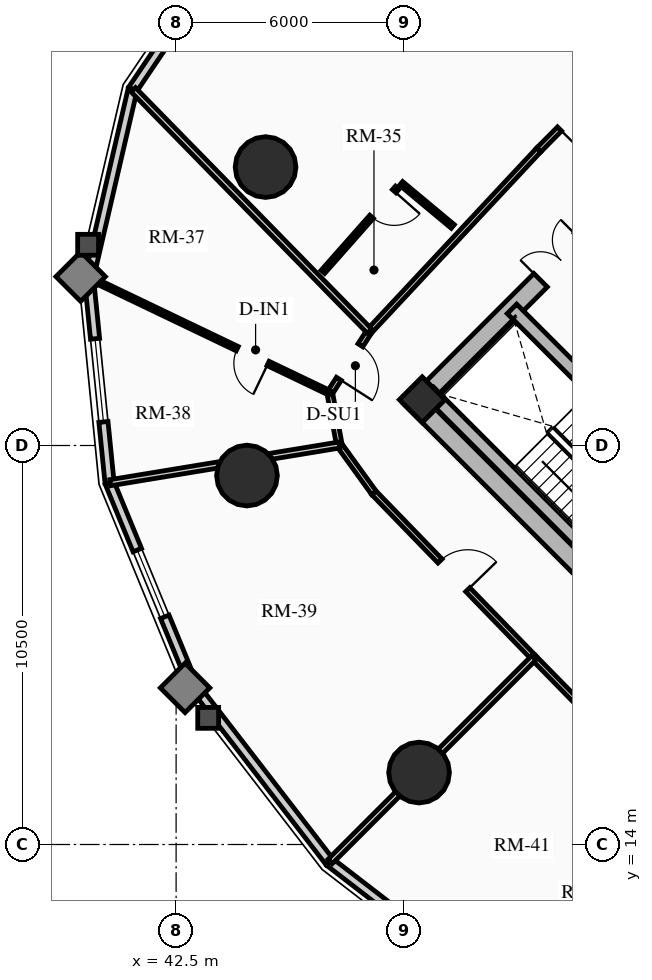
"""IFC4 building model, lengths in metres.
Left out: names, types, materials, properties, quantities, classifications, styles, units other than length and angle.
Written with IfcOpenShell. Run it as: python <this file> out.ifc"""

import sys

from ifc_helpers import new_model, si_unit, direction, frame, frame_2d, origin, origin_2d, place, context, subcontext, project, spatial, rectangle, circle, extrude, source, transform, mapped, element, fill, save


model = new_model("IFC4")
c1 = context("Model", 3, precision=1e-05, world=origin(), true_north=direction((0.0, 1.0)))
c2 = subcontext(c1, "Body", "Model", "MODEL_VIEW")
j1 = project(units=[si_unit("LENGTHUNIT", "METRE"), si_unit("PLANEANGLEUNIT", "RADIAN")], contexts=[c1])
p1 = place(None, origin())
s1 = spatial("IfcSite", under=j1, at=p1, CompositionType="ELEMENT")
p2 = place(p1, origin())
s2 = spatial("IfcBuilding", under=s1, at=p2, CompositionType="ELEMENT")
p3 = place(p2, frame((0.0, 0.0, 30.73)))
s3 = spatial("IfcBuildingStorey", under=s2, at=p3, CompositionType="ELEMENT", Elevation=30.73)
p4 = place(p3, frame((58.773, 15.661, 0.0), z_axis=(0.0, 0.0, 1.0), x_axis=(-0.707106781187, 0.707106781187, 0.0)))
e1 = element("IfcWall", 1, at=p4, inside=s3, PredefinedType="SHEAR", context=c2, shape_type="SweptSolid", body=[
    extrude(rectangle(XDim=14.3, YDim=0.5, at=frame_2d((7.15, 0.0))), origin(), (0.0, 0.0, 1.0), 2.91),
])
p5 = place(p3, frame((48.838, 25.596, 0.0), z_axis=(0.0, 0.0, 1.0), x_axis=(0.707106781187, 0.707106781187, 0.0)))
e2 = element("IfcWall", 2, at=p5, inside=s3, PredefinedType="SHEAR", context=c2, shape_type="SweptSolid", body=[
    extrude(rectangle(XDim=10.7, YDim=0.5, at=frame_2d((5.35, 0.0))), origin(), (0.0, 0.0, 1.0), 2.91),
])
m1 = source(origin(), c2, "Body", "SweptSolid", [
    extrude(rectangle(XDim=1.5, YDim=2.02, at=frame_2d((0.75, 1.01))), frame((0.0, 0.26, 0.0), z_axis=(0.0, -1.0, 0.0), x_axis=(1.0, 0.0, 0.0)), (0.0, 0.0, 1.0), 0.52),
])
p6 = place(p5, frame((4.6, 0.0, 0.0)))
e3 = element("IfcOpeningElement", 3, at=p6, cuts=e2, PredefinedType="OPENING", context=c2, shape_type="MappedRepresentation", body=[
    mapped(m1, transform((0.0, 0.0, 0.0), x_axis=(1.0, 0.0, 0.0), y_axis=(0.0, 1.0, 0.0), z_axis=(0.0, 0.0, 1.0), scale=1.0)),
])
p7 = place(p3, frame((61.096, 18.338, 0.0), z_axis=(0.0, 0.0, 1.0), x_axis=(-0.707106781187, 0.707106781187, 0.0)))
e4 = element("IfcWall", 4, at=p7, inside=s3, PredefinedType="SHEAR", context=c2, shape_type="SweptSolid", body=[
    extrude(rectangle(XDim=13.8, YDim=0.35, at=frame_2d((6.9, 0.0))), origin(), (0.0, 0.0, 1.0), 2.91),
])
m2 = source(origin(), c2, "Body", "SweptSolid", [
    extrude(rectangle(XDim=1.1, YDim=2.015, at=frame_2d((0.55, 1.007))), frame((0.0, 0.185, 0.0), z_axis=(0.0, -1.0, 0.0), x_axis=(1.0, 0.0, 0.0)), (0.0, 0.0, 1.0), 0.37),
])
p8 = place(p7, frame((4.9, 0.0, 0.0)))
e5 = element("IfcOpeningElement", 5, at=p8, cuts=e4, PredefinedType="OPENING", context=c2, shape_type="MappedRepresentation", body=[
    mapped(m2, transform((0.0, 0.0, 0.0), x_axis=(1.0, 0.0, 0.0), y_axis=(0.0, 1.0, 0.0), z_axis=(0.0, 0.0, 1.0), scale=1.0)),
])
m3 = source(origin(), c2, "Body", "SweptSolid", [
    extrude(rectangle(XDim=1.15, YDim=2.02, at=frame_2d((0.575, 1.01))), frame((0.0, 0.185, 0.0), z_axis=(0.0, -1.0, 0.0), x_axis=(1.0, 0.0, 0.0)), (0.0, 0.0, 1.0), 0.37),
])
p9 = place(p7, frame((7.32, 0.0, 0.0)))
e6 = element("IfcOpeningElement", 6, at=p9, cuts=e4, PredefinedType="OPENING", context=c2, shape_type="MappedRepresentation", body=[
    mapped(m3, transform((0.0, 0.0, 0.0), x_axis=(1.0, 0.0, 0.0), y_axis=(0.0, 1.0, 0.0), z_axis=(0.0, 0.0, 1.0), scale=1.0)),
])
p10 = place(p3, frame((53.922, 21.141, 0.0), z_axis=(0.0, 0.0, 1.0), x_axis=(-0.707106781187, 0.707106781187, 0.0)))
e7 = element("IfcWall", 7, at=p10, inside=s3, PredefinedType="SHEAR", context=c2, shape_type="SweptSolid", body=[
    extrude(rectangle(XDim=6.745, YDim=0.35, at=frame_2d((3.373, 0.0))), origin(), (0.0, 0.0, 1.0), 2.91),
])
p11 = place(p3, frame((48.976, 25.706, 0.0), z_axis=(0.0, 0.0, 1.0), x_axis=(0.707106781187, 0.707106781187, 0.0)))
e8 = element("IfcColumn", 8, at=p11, inside=s3, PredefinedType="COLUMN", context=c2, shape_type="SweptSolid", body=[
    extrude(rectangle(XDim=0.85, YDim=0.85, at=origin_2d()), origin(), (0.0, 0.0, 1.0), 2.91),
])
for number, where, z_axis, x_axis in (
    (9, (44.854, 31.827, 0.0), (0.0, 0.0, 1.0), (1.0, 0.0, 0.0)),
    (10, (44.365, 23.709, 0.0), (0.0, 0.0, 1.0), (1.0, 0.0, 0.0)),
    (11, (48.893, 15.893, 0.0), (0.0, 0.0, 1.0), (1.0, 0.0, 0.0)),
):
    element("IfcColumn", number, at=place(p3, frame(where, z_axis=z_axis, x_axis=x_axis)), inside=s3, PredefinedType="USERDEFINED", context=c2, shape_type="SweptSolid", body=[
        extrude(circle(Radius=0.8, at=origin_2d()), origin(), (0.0, 0.0, 1.0), 2.91),
    ])
p12 = place(p3, frame((41.356, 33.871, 0.0), z_axis=(0.0, 0.0, 1.0), x_axis=(0.559621532896, 0.828748297084, 0.0)))
e12 = element("IfcWall", 12, at=p12, inside=s3, PredefinedType="SOLIDWALL", context=c2, shape_type="SweptSolid", body=[
    extrude(rectangle(XDim=4.879, YDim=0.24, at=frame_2d((2.439, 0.0))), origin(), (0.0, 0.0, 1.0), 2.073),
])
m4 = source(origin(), c2, "Body", "SweptSolid", [
    extrude(rectangle(XDim=1.9, YDim=1.35, at=frame_2d((0.95, 0.675))), frame((0.0, 0.13, 0.0), z_axis=(0.0, -1.0, 0.0), x_axis=(1.0, 0.0, 0.0)), (0.0, 0.0, 1.0), 0.26),
])
p13 = place(p12, frame((1.489, 0.0, 0.65)))
e13 = element("IfcOpeningElement", 13, at=p13, cuts=e12, PredefinedType="OPENING", context=c2, shape_type="MappedRepresentation", body=[
    mapped(m4, transform((0.0, 0.0, 0.0), x_axis=(1.0, 0.0, 0.0), y_axis=(0.0, 1.0, 0.0), z_axis=(0.0, 0.0, 1.0), scale=1.0)),
])
p14 = place(p3, frame((40.206, 28.91, 0.0), z_axis=(0.0, 0.0, 1.0), x_axis=(0.22582585901, 0.974167686491, 0.0)))
e14 = element("IfcWall", 14, at=p14, inside=s3, PredefinedType="SOLIDWALL", context=c2, shape_type="SweptSolid", body=[
    extrude(rectangle(XDim=5.092, YDim=0.24, at=frame_2d((2.546, 0.0))), origin(), (0.0, 0.0, 1.0), 2.073),
])
p15 = place(p3, frame((40.749, 23.518, 0.0), z_axis=(0.0, 0.0, 1.0), x_axis=(-0.100190592135, 0.994968263437, 0.0)))
e15 = element("IfcWall", 15, at=p15, inside=s3, PredefinedType="SOLIDWALL", context=c2, shape_type="SweptSolid", body=[
    extrude(rectangle(XDim=5.419, YDim=0.24, at=frame_2d((2.71, 0.0))), origin(), (0.0, 0.0, 1.0), 2.073),
])
m5 = source(origin(), c2, "Body", "SweptSolid", [
    extrude(rectangle(XDim=2.2, YDim=1.35, at=frame_2d((1.1, 0.675))), frame((0.0, 0.13, 0.0), z_axis=(0.0, -1.0, 0.0), x_axis=(1.0, 0.0, 0.0)), (0.0, 0.0, 1.0), 0.26),
])
p16 = place(p15, frame((1.61, 0.0, 0.65)))
e16 = element("IfcOpeningElement", 16, at=p16, cuts=e15, PredefinedType="OPENING", context=c2, shape_type="MappedRepresentation", body=[
    mapped(m5, transform((0.0, 0.0, 0.0), x_axis=(1.0, 0.0, 0.0), y_axis=(0.0, 1.0, 0.0), z_axis=(0.0, 0.0, 1.0), scale=1.0)),
])
p17 = place(p3, frame((42.932, 18.222, 0.0), z_axis=(0.0, 0.0, 1.0), x_axis=(-0.381077764176, 0.924542988536, 0.0)))
e17 = element("IfcWall", 17, at=p17, inside=s3, PredefinedType="SOLIDWALL", context=c2, shape_type="SweptSolid", body=[
    extrude(rectangle(XDim=5.728, YDim=0.24, at=frame_2d((2.864, 0.0))), origin(), (0.0, 0.0, 1.0), 2.073),
])
p18 = place(p17, frame((1.914, 0.0, 0.65)))
e18 = element("IfcOpeningElement", 18, at=p18, cuts=e17, PredefinedType="OPENING", context=c2, shape_type="MappedRepresentation", body=[
    mapped(m4, transform((0.0, 0.0, 0.0), x_axis=(1.0, 0.0, 0.0), y_axis=(0.0, 1.0, 0.0), z_axis=(0.0, 0.0, 1.0), scale=1.0)),
])
p19 = place(p3, frame((46.541, 13.541, 0.0), z_axis=(0.0, 0.0, 1.0), x_axis=(-0.610494906082, 0.792020182601, 0.0)))
e19 = element("IfcWall", 19, at=p19, inside=s3, PredefinedType="SOLIDWALL", context=c2, shape_type="SweptSolid", body=[
    extrude(rectangle(XDim=5.911, YDim=0.24, at=frame_2d((2.956, 0.0))), origin(), (0.0, 0.0, 1.0), 2.073),
])
p20 = place(p3, frame((51.222, 9.932, 0.0), z_axis=(0.0, 0.0, 1.0), x_axis=(-0.792020182601, 0.610494906082, 0.0)))
e20 = element("IfcWall", 20, at=p20, inside=s3, PredefinedType="SOLIDWALL", context=c2, shape_type="SweptSolid", body=[
    extrude(rectangle(XDim=5.911, YDim=0.24, at=frame_2d((2.956, 0.0))), origin(), (0.0, 0.0, 1.0), 2.073),
])
p21 = place(p20, frame((1.855, 0.0, 0.65)))
e21 = element("IfcOpeningElement", 21, at=p21, cuts=e20, PredefinedType="OPENING", context=c2, shape_type="MappedRepresentation", body=[
    mapped(m5, transform((0.0, 0.0, 0.0), x_axis=(1.0, 0.0, 0.0), y_axis=(0.0, 1.0, 0.0), z_axis=(0.0, 0.0, 1.0), scale=1.0)),
])
p22 = place(p3, frame((54.427, 34.683, 0.0), z_axis=(0.0, 0.0, 1.0), x_axis=(-0.704178989986, -0.710022499687, 0.0)))
e22 = element("IfcWall", 22, at=p22, inside=s3, PredefinedType="PARTITIONING", context=c2, shape_type="SweptSolid", body=[
    extrude(rectangle(XDim=3.384, YDim=0.15, at=frame_2d((1.692, 0.0))), origin(), (0.0, 0.0, 1.0), 2.159),
])
m6 = source(origin(), c2, "Body", "SweptSolid", [
    extrude(rectangle(XDim=1.05, YDim=2.015, at=frame_2d((0.525, 1.007))), frame((0.0, 0.085, 0.0), z_axis=(0.0, -1.0, 0.0), x_axis=(1.0, 0.0, 0.0)), (0.0, 0.0, 1.0), 0.17),
])
p23 = place(p22, frame((1.56, 0.0, 0.0)))
e23 = element("IfcOpeningElement", 23, at=p23, cuts=e22, PredefinedType="OPENING", context=c2, shape_type="MappedRepresentation", body=[
    mapped(m6, transform((0.0, 0.0, 0.0), x_axis=(1.0, 0.0, 0.0), y_axis=(0.0, 1.0, 0.0), z_axis=(0.0, 0.0, 1.0), scale=1.0)),
])
p24 = place(p3, frame((52.043, 32.28, 0.0), z_axis=(0.0, 0.0, 1.0), x_axis=(-0.682606081633, -0.730786519661, 0.0)))
e24 = element("IfcWall", 24, at=p24, inside=s3, PredefinedType="PARTITIONING", context=c2, shape_type="SweptSolid", body=[
    extrude(rectangle(XDim=6.527, YDim=0.15, at=frame_2d((3.263, 0.0))), origin(), (0.0, 0.0, 1.0), 2.159),
])
p25 = place(p3, frame((47.588, 27.51, 0.0), z_axis=(0.0, 0.0, 1.0), x_axis=(-0.540202619347, -0.841534984449, 0.0)))
e25 = element("IfcWall", 25, at=p25, inside=s3, PredefinedType="PARTITIONING", context=c2, shape_type="SweptSolid", body=[
    extrude(rectangle(XDim=1.935, YDim=0.15, at=frame_2d((0.967, 0.0))), origin(), (0.0, 0.0, 1.0), 2.159),
])
p26 = place(p25, frame((0.442, 0.0, 0.0)))
e26 = element("IfcOpeningElement", 26, at=p26, cuts=e25, PredefinedType="OPENING", context=c2, shape_type="MappedRepresentation", body=[
    mapped(m6, transform((0.0, 0.0, 0.0), x_axis=(1.0, 0.0, 0.0), y_axis=(0.0, 1.0, 0.0), z_axis=(0.0, 0.0, 1.0), scale=1.0)),
])
p27 = place(p3, frame((46.543, 25.882, 0.0), z_axis=(0.0, 0.0, 1.0), x_axis=(0.181153502579, -0.983454832976, 0.0)))
e27 = element("IfcWall", 27, at=p27, inside=s3, PredefinedType="PARTITIONING", context=c2, shape_type="SweptSolid", body=[
    extrude(rectangle(XDim=1.392, YDim=0.15, at=frame_2d((0.696, 0.0))), origin(), (0.0, 0.0, 1.0), 2.159),
])
p28 = place(p3, frame((46.795, 24.513, 0.0), z_axis=(0.0, 0.0, 1.0), x_axis=(0.585628197524, -0.810579801294, 0.0)))
e28 = element("IfcWall", 28, at=p28, inside=s3, PredefinedType="PARTITIONING", context=c2, shape_type="SweptSolid", body=[
    extrude(rectangle(XDim=1.554, YDim=0.15, at=frame_2d((0.777, 0.0))), origin(), (0.0, 0.0, 1.0), 2.205),
])
p29 = place(p3, frame((47.706, 23.253, 0.0), z_axis=(0.0, 0.0, 1.0), x_axis=(0.696179266346, -0.717867974707, 0.0)))
e29 = element("IfcWall", 29, at=p29, inside=s3, PredefinedType="PARTITIONING", context=c2, shape_type="SweptSolid", body=[
    extrude(rectangle(XDim=6.045, YDim=0.15, at=frame_2d((3.022, 0.0))), origin(), (0.0, 0.0, 1.0), 2.635),
])
p30 = place(p29, frame((2.497, 0.0, 0.0)))
e30 = element("IfcOpeningElement", 30, at=p30, cuts=e29, PredefinedType="OPENING", context=c2, shape_type="MappedRepresentation", body=[
    mapped(m6, transform((0.0, 0.0, 0.0), x_axis=(1.0, 0.0, 0.0), y_axis=(0.0, 1.0, 0.0), z_axis=(0.0, 0.0, 1.0), scale=1.0)),
])
p31 = place(p3, frame((51.914, 18.914, 0.0), z_axis=(0.0, 0.0, 1.0), x_axis=(0.699999313799, -0.714143515465, 0.0)))
e31 = element("IfcWall", 31, at=p31, inside=s3, PredefinedType="PARTITIONING", context=c2, shape_type="SweptSolid", body=[
    extrude(rectangle(XDim=6.162, YDim=0.15, at=frame_2d((3.081, 0.0))), origin(), (0.0, 0.0, 1.0), 2.159),
])
p32 = place(p31, frame((2.556, 0.0, 0.0)))
e32 = element("IfcOpeningElement", 32, at=p32, cuts=e31, PredefinedType="OPENING", context=c2, shape_type="MappedRepresentation", body=[
    mapped(m6, transform((0.0, 0.0, 0.0), x_axis=(1.0, 0.0, 0.0), y_axis=(0.0, 1.0, 0.0), z_axis=(0.0, 0.0, 1.0), scale=1.0)),
])
p33 = place(p3, frame((54.427, 34.683, 0.0), z_axis=(0.0, 0.0, 1.0), x_axis=(-0.726732956694, 0.686920089716, 0.0)))
e33 = element("IfcWall", 33, at=p33, inside=s3, PredefinedType="PARTITIONING", context=c2, shape_type="SweptSolid", body=[
    extrude(rectangle(XDim=8.653, YDim=0.16, at=frame_2d((4.326, 0.0))), origin(), (0.0, 0.0, 1.0), 2.073),
])
p34 = place(p3, frame((47.588, 27.51, 0.0), z_axis=(0.0, 0.0, 1.0), x_axis=(-0.699371977892, 0.714757886657, 0.0)))
e34 = element("IfcWall", 34, at=p34, inside=s3, PredefinedType="PARTITIONING", context=c2, shape_type="SweptSolid", body=[
    extrude(rectangle(XDim=8.886, YDim=0.16, at=frame_2d((4.443, 0.0))), origin(), (0.0, 0.0, 1.0), 2.073),
])
p35 = place(p3, frame((46.795, 24.513, 0.0), z_axis=(0.0, 0.0, 1.0), x_axis=(-0.986729986004, -0.162369746937, 0.0)))
e35 = element("IfcWall", 35, at=p35, inside=s3, PredefinedType="PARTITIONING", context=c2, shape_type="SweptSolid", body=[
    extrude(rectangle(XDim=6.108, YDim=0.16, at=frame_2d((3.054, 0.0))), origin(), (0.0, 0.0, 1.0), 2.073),
])
p36 = place(p3, frame((51.914, 18.914, 0.0), z_axis=(0.0, 0.0, 1.0), x_axis=(-0.707106781187, -0.707106781187, 0.0)))
e36 = element("IfcWall", 36, at=p36, inside=s3, PredefinedType="PARTITIONING", context=c2, shape_type="SweptSolid", body=[
    extrude(rectangle(XDim=7.579, YDim=0.16, at=frame_2d((3.79, 0.0))), origin(), (0.0, 0.0, 1.0), 2.073),
])
p37 = place(p3, frame((49.78, 30.264, 0.0), z_axis=(0.0, 0.0, 1.0), x_axis=(-0.768209972595, 0.640197967824, 0.0)))
e37 = element("IfcWall", 37, at=p37, inside=s3, PredefinedType="PARTITIONING", context=c2, shape_type="SweptSolid", body=[
    extrude(rectangle(XDim=1.77, YDim=0.125, at=frame_2d((0.885, 0.0))), origin(), (0.0, 0.0, 1.0), 2.635),
])
p38 = place(p3, frame((48.318, 31.282, 0.0), z_axis=(0.0, 0.0, 1.0), x_axis=(-0.662365127428, -0.749181178333, 0.0)))
e38 = element("IfcWall", 38, at=p38, inside=s3, PredefinedType="PARTITIONING", context=c2, shape_type="SweptSolid", body=[
    extrude(rectangle(XDim=2.953, YDim=0.125, at=frame_2d((1.477, 0.0))), origin(), (0.0, 0.0, 1.0), 2.159),
])
m7 = source(origin(), c2, "Body", "SweptSolid", [
    extrude(rectangle(XDim=0.9, YDim=2.005, at=frame_2d((0.45, 1.002))), frame((0.0, 0.073, 0.0), z_axis=(0.0, -1.0, 0.0), x_axis=(1.0, 0.0, 0.0)), (0.0, 0.0, 1.0), 0.145),
])
p39 = place(p38, frame((0.12, 0.0, 0.0)))
e39 = element("IfcOpeningElement", 39, at=p39, cuts=e38, PredefinedType="OPENING", context=c2, shape_type="MappedRepresentation", body=[
    mapped(m7, transform((0.0, 0.0, 0.0), x_axis=(1.0, 0.0, 0.0), y_axis=(0.0, 1.0, 0.0), z_axis=(0.0, 0.0, 1.0), scale=1.0)),
])
p40 = place(p3, frame((46.543, 25.882, 0.0), z_axis=(0.0, 0.0, 1.0), x_axis=(-0.901937110034, 0.431867398103, 0.0)))
e40 = element("IfcWall", 40, at=p40, inside=s3, PredefinedType="PARTITIONING", context=c2, shape_type="SweptSolid", body=[
    extrude(rectangle(XDim=7.004, YDim=0.125, at=frame_2d((3.502, 0.0))), origin(), (0.0, 0.0, 1.0), 2.073),
])
p41 = place(p40, frame((1.8, 0.0, 0.0)))
e41 = element("IfcOpeningElement", 41, at=p41, cuts=e40, PredefinedType="OPENING", context=c2, shape_type="MappedRepresentation", body=[
    mapped(m7, transform((0.0, 0.0, 0.0), x_axis=(1.0, 0.0, 0.0), y_axis=(0.0, 1.0, 0.0), z_axis=(0.0, 0.0, 1.0), scale=1.0)),
])
m8 = source(origin(), c2, "Body", "SweptSolid", [
    extrude(rectangle(XDim=2.2, YDim=1.35, at=frame_2d((1.1, 0.675))), frame((0.0, 0.03, 0.0), z_axis=(0.0, -1.0, 0.0), x_axis=(1.0, 0.0, 0.0)), (0.0, 0.0, 1.0), 0.06),
])
p42 = place(p16, origin())
e42 = element("IfcWindow", 42, at=p42, inside=s3, PartitioningType="DOUBLE_PANEL_VERTICAL", PredefinedType="WINDOW", context=c2, shape_type="MappedRepresentation", body=[
    mapped(m8, transform((0.0, 0.0, 0.0), x_axis=(1.0, 0.0, 0.0), y_axis=(0.0, 1.0, 0.0), z_axis=(0.0, 0.0, 1.0), scale=1.0)),
])
fill(e16, e42)
m9 = source(origin(), c2, "Body", "SweptSolid", [
    extrude(rectangle(XDim=1.9, YDim=1.35, at=frame_2d((0.95, 0.675))), frame((0.0, 0.03, 0.0), z_axis=(0.0, -1.0, 0.0), x_axis=(1.0, 0.0, 0.0)), (0.0, 0.0, 1.0), 0.06),
])
p43 = place(p18, origin())
e43 = element("IfcWindow", 43, at=p43, inside=s3, PartitioningType="DOUBLE_PANEL_VERTICAL", PredefinedType="WINDOW", context=c2, shape_type="MappedRepresentation", body=[
    mapped(m9, transform((0.0, 0.0, 0.0), x_axis=(1.0, 0.0, 0.0), y_axis=(0.0, 1.0, 0.0), z_axis=(0.0, 0.0, 1.0), scale=1.0)),
])
fill(e18, e43)
m10 = source(origin(), c2, "Body", "SweptSolid", [
    extrude(rectangle(XDim=1.5, YDim=2.02, at=frame_2d((0.75, 1.01))), frame((0.0, 0.025, 0.0), z_axis=(0.0, -1.0, 0.0), x_axis=(1.0, 0.0, 0.0)), (0.0, 0.0, 1.0), 0.05),
])
p44 = place(p6, origin())
e44 = element("IfcDoor", 44, at=p44, inside=s3, OperationType="DOUBLE_DOOR_SINGLE_SWING", PredefinedType="DOOR", context=c2, shape_type="MappedRepresentation", body=[
    mapped(m10, transform((0.0, 0.0, 0.0), x_axis=(1.0, 0.0, 0.0), y_axis=(0.0, 1.0, 0.0), z_axis=(0.0, 0.0, 1.0), scale=1.0)),
])
fill(e3, e44)
m11 = source(origin(), c2, "Body", "SweptSolid", [
    extrude(rectangle(XDim=1.05, YDim=2.015, at=frame_2d((0.525, 1.007))), frame((0.0, 0.025, 0.0), z_axis=(0.0, -1.0, 0.0), x_axis=(1.0, 0.0, 0.0)), (0.0, 0.0, 1.0), 0.05),
])
p45 = place(p23, origin())
e45 = element("IfcDoor", 45, at=p45, inside=s3, OperationType="SINGLE_SWING_RIGHT", PredefinedType="DOOR", context=c2, shape_type="MappedRepresentation", body=[
    mapped(m11, transform((0.0, 0.0, 0.0), x_axis=(1.0, 0.0, 0.0), y_axis=(0.0, 1.0, 0.0), z_axis=(0.0, 0.0, 1.0), scale=1.0)),
])
fill(e23, e45)
m12 = source(origin(), c2, "Body", "SweptSolid", [
    extrude(rectangle(XDim=0.9, YDim=2.005, at=frame_2d((0.45, 1.002))), frame((0.0, 0.025, 0.0), z_axis=(0.0, -1.0, 0.0), x_axis=(1.0, 0.0, 0.0)), (0.0, 0.0, 1.0), 0.05),
])
p46 = place(p39, origin())
e46 = element("IfcDoor", 46, at=p46, inside=s3, OperationType="SINGLE_SWING_LEFT", PredefinedType="DOOR", context=c2, shape_type="MappedRepresentation", body=[
    mapped(m12, transform((0.0, 0.0, 0.0), x_axis=(1.0, 0.0, 0.0), y_axis=(0.0, 1.0, 0.0), z_axis=(0.0, 0.0, 1.0), scale=1.0)),
])
fill(e39, e46)
p47 = place(p26, origin())
e47 = element("IfcDoor", 47, at=p47, inside=s3, OperationType="SINGLE_SWING_RIGHT", PredefinedType="DOOR", context=c2, shape_type="MappedRepresentation", body=[
    mapped(m11, transform((0.0, 0.0, 0.0), x_axis=(1.0, 0.0, 0.0), y_axis=(0.0, 1.0, 0.0), z_axis=(0.0, 0.0, 1.0), scale=1.0)),
])
fill(e26, e47)
p48 = place(p41, origin())
e48 = element("IfcDoor", 48, at=p48, inside=s3, OperationType="SINGLE_SWING_LEFT", PredefinedType="DOOR", context=c2, shape_type="MappedRepresentation", body=[
    mapped(m12, transform((0.0, 0.0, 0.0), x_axis=(1.0, 0.0, 0.0), y_axis=(0.0, 1.0, 0.0), z_axis=(0.0, 0.0, 1.0), scale=1.0)),
])
fill(e41, e48)
p49 = place(p30, origin())
e49 = element("IfcDoor", 49, at=p49, inside=s3, OperationType="SINGLE_SWING_RIGHT", PredefinedType="DOOR", context=c2, shape_type="MappedRepresentation", body=[
    mapped(m11, transform((0.0, 0.0, 0.0), x_axis=(1.0, 0.0, 0.0), y_axis=(0.0, 1.0, 0.0), z_axis=(0.0, 0.0, 1.0), scale=1.0)),
])
fill(e30, e49)
save(model, sys.argv[1])
